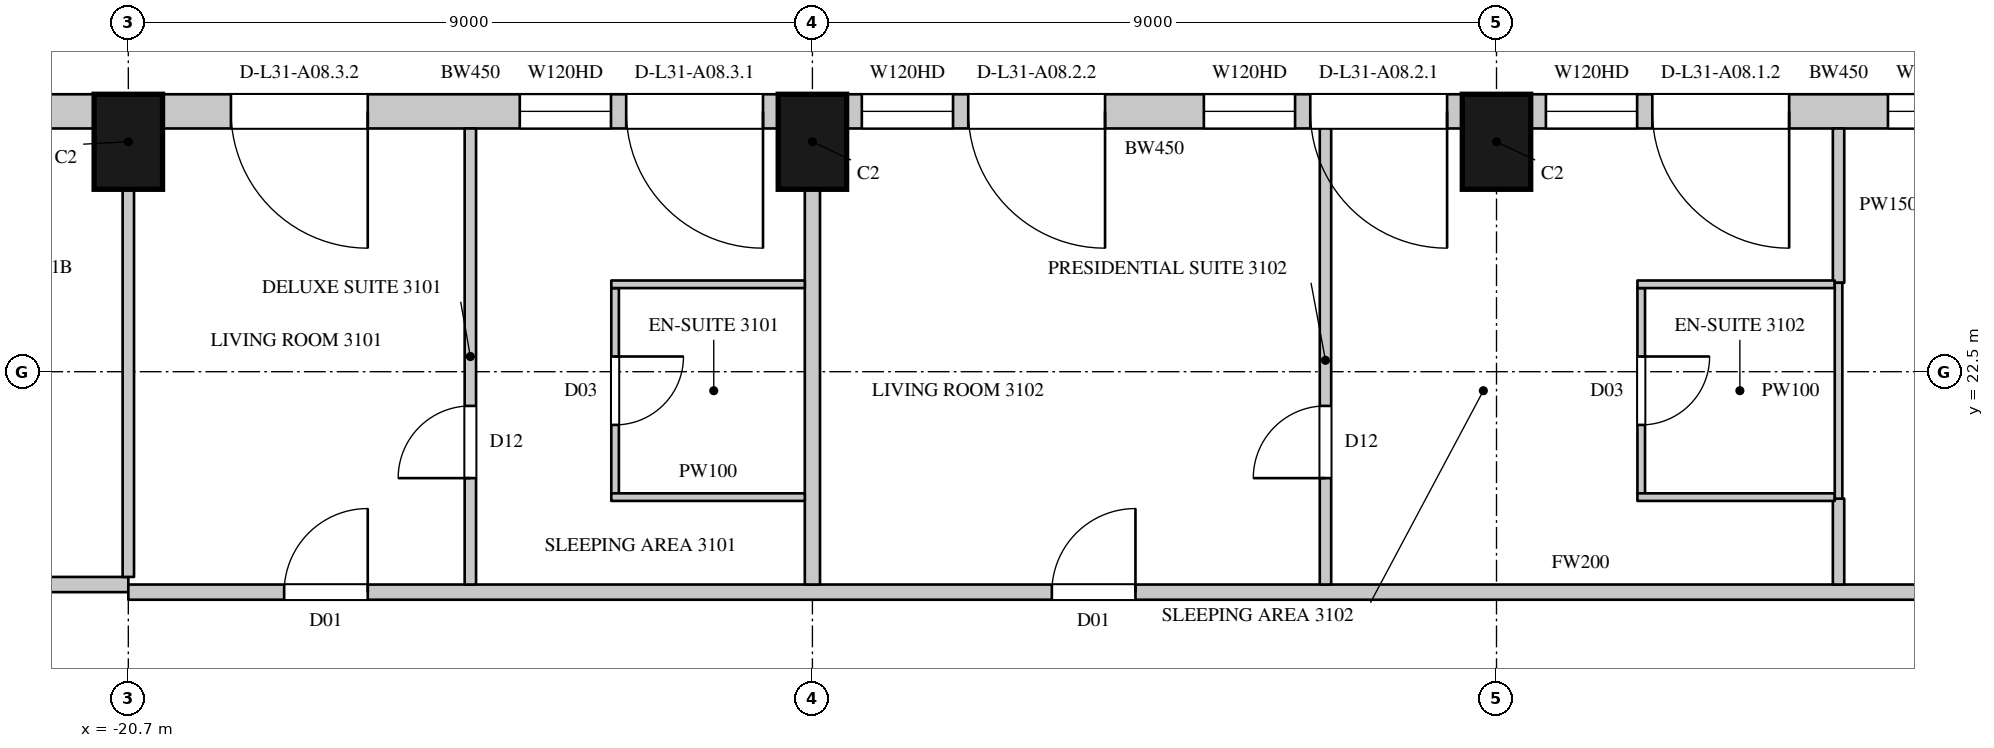
"""IFC4 building model, lengths in metres.
Left out: names, types, materials, properties, quantities, classifications, styles, units other than length and angle.
Written with IfcOpenShell. Run it as: python <this file> out.ifc"""

import sys

from ifc_helpers import new_model, si_unit, direction, frame, frame_2d, origin, origin_2d, place, context, subcontext, project, spatial, rectangle, extrude, element, fill, save


model = new_model("IFC4")
c1 = context("Model", 3, precision=1e-05, world=origin(), true_north=direction((0.0, 1.0)))
c2 = subcontext(c1, "Body", "Model", "MODEL_VIEW")
j1 = project(units=[si_unit("LENGTHUNIT", "METRE"), si_unit("PLANEANGLEUNIT", "RADIAN")], contexts=[c1])
p1 = place(None, origin())
s1 = spatial("IfcSite", under=j1, at=p1, CompositionType="ELEMENT")
p2 = place(p1, origin())
s2 = spatial("IfcBuilding", under=s1, at=p2, CompositionType="ELEMENT")
p3 = place(p2, frame((0.0, 0.0, 141.9)))
s3 = spatial("IfcBuildingStorey", under=s2, at=p3, CompositionType="ELEMENT", Elevation=141.9)
for number, where, z_axis, x_axis in (
    (1, (-2.7, 25.525, 0.0), (0.0, 0.0, 1.0), (-1.0, 0.0, 0.0)),
    (2, (-11.7, 25.525, 0.0), (0.0, 0.0, 1.0), (-1.0, 0.0, 0.0)),
    (3, (-20.7, 25.525, 0.0), (0.0, 0.0, 1.0), (-1.0, 0.0, 0.0)),
):
    element("IfcColumn", number, at=place(p3, frame(where, z_axis=z_axis, x_axis=x_axis)), inside=s3, PredefinedType="COLUMN", context=c2, shape_type="SweptSolid", body=[
        extrude(rectangle(XDim=0.9, YDim=1.25, at=origin_2d()), origin(), (0.0, 0.0, 1.0), 3.6),
    ])
p4 = place(p3, frame((5.85, 25.925, 0.0), z_axis=(0.0, 0.0, 1.0), x_axis=(-1.0, 0.0, 0.0)))
e4 = element("IfcWall", 4, at=p4, inside=s3, PredefinedType="SOLIDWALL", context=c2, shape_type="SweptSolid", body=[
    extrude(rectangle(XDim=8.1, YDim=0.45, at=frame_2d((4.05, 0.0))), origin(), (0.0, 0.0, 1.0), 3.3),
])
p5 = place(p4, frame((0.2, 0.0, 0.0)))
e5 = element("IfcOpeningElement", 5, at=p5, cuts=e4, PredefinedType="OPENING", context=c2, shape_type="SweptSolid", body=[
    extrude(rectangle(XDim=1.8, YDim=2.4, at=frame_2d((0.9, 1.2))), frame((0.0, 0.235, 0.0), z_axis=(0.0, -1.0, 0.0), x_axis=(1.0, 0.0, 0.0)), (0.0, 0.0, 1.0), 0.47),
])
p6 = place(p4, frame((2.2, 0.0, 1.05)))
e6 = element("IfcOpeningElement", 6, at=p6, cuts=e4, PredefinedType="OPENING", context=c2, shape_type="SweptSolid", body=[
    extrude(rectangle(XDim=1.2, YDim=2.0, at=frame_2d((0.6, 1.0))), frame((0.0, 0.235, 0.0), z_axis=(0.0, -1.0, 0.0), x_axis=(1.0, 0.0, 0.0)), (0.0, 0.0, 1.0), 0.47),
])
p7 = place(p4, frame((4.7, 0.0, 0.0)))
e7 = element("IfcOpeningElement", 7, at=p7, cuts=e4, PredefinedType="OPENING", context=c2, shape_type="SweptSolid", body=[
    extrude(rectangle(XDim=1.8, YDim=2.4, at=frame_2d((0.9, 1.2))), frame((0.0, 0.235, 0.0), z_axis=(0.0, -1.0, 0.0), x_axis=(1.0, 0.0, 0.0)), (0.0, 0.0, 1.0), 0.47),
])
p8 = place(p4, frame((6.7, 0.0, 1.05)))
e8 = element("IfcOpeningElement", 8, at=p8, cuts=e4, PredefinedType="OPENING", context=c2, shape_type="SweptSolid", body=[
    extrude(rectangle(XDim=1.2, YDim=2.0, at=frame_2d((0.6, 1.0))), frame((0.0, 0.235, 0.0), z_axis=(0.0, -1.0, 0.0), x_axis=(1.0, 0.0, 0.0)), (0.0, 0.0, 1.0), 0.47),
])
p9 = place(p3, frame((-3.15, 25.925, 0.0), z_axis=(0.0, 0.0, 1.0), x_axis=(-1.0, 0.0, 0.0)))
e9 = element("IfcWall", 9, at=p9, inside=s3, PredefinedType="SOLIDWALL", context=c2, shape_type="SweptSolid", body=[
    extrude(rectangle(XDim=8.1, YDim=0.45, at=frame_2d((4.05, 0.0))), origin(), (0.0, 0.0, 1.0), 3.3),
])
p10 = place(p9, frame((0.2, 0.0, 0.0)))
e10 = element("IfcOpeningElement", 10, at=p10, cuts=e9, PredefinedType="OPENING", context=c2, shape_type="SweptSolid", body=[
    extrude(rectangle(XDim=1.8, YDim=2.4, at=frame_2d((0.9, 1.2))), frame((0.0, 0.235, 0.0), z_axis=(0.0, -1.0, 0.0), x_axis=(1.0, 0.0, 0.0)), (0.0, 0.0, 1.0), 0.47),
])
p11 = place(p9, frame((2.2, 0.0, 1.05)))
e11 = element("IfcOpeningElement", 11, at=p11, cuts=e9, PredefinedType="OPENING", context=c2, shape_type="SweptSolid", body=[
    extrude(rectangle(XDim=1.2, YDim=2.0, at=frame_2d((0.6, 1.0))), frame((0.0, 0.235, 0.0), z_axis=(0.0, -1.0, 0.0), x_axis=(1.0, 0.0, 0.0)), (0.0, 0.0, 1.0), 0.47),
])
p12 = place(p9, frame((4.7, 0.0, 0.0)))
e12 = element("IfcOpeningElement", 12, at=p12, cuts=e9, PredefinedType="OPENING", context=c2, shape_type="SweptSolid", body=[
    extrude(rectangle(XDim=1.8, YDim=2.4, at=frame_2d((0.9, 1.2))), frame((0.0, 0.235, 0.0), z_axis=(0.0, -1.0, 0.0), x_axis=(1.0, 0.0, 0.0)), (0.0, 0.0, 1.0), 0.47),
])
p13 = place(p9, frame((6.7, 0.0, 1.05)))
e13 = element("IfcOpeningElement", 13, at=p13, cuts=e9, PredefinedType="OPENING", context=c2, shape_type="SweptSolid", body=[
    extrude(rectangle(XDim=1.2, YDim=2.0, at=frame_2d((0.6, 1.0))), frame((0.0, 0.235, 0.0), z_axis=(0.0, -1.0, 0.0), x_axis=(1.0, 0.0, 0.0)), (0.0, 0.0, 1.0), 0.47),
])
p14 = place(p3, frame((-12.15, 25.925, 0.0), z_axis=(0.0, 0.0, 1.0), x_axis=(-1.0, 0.0, 0.0)))
e14 = element("IfcWall", 14, at=p14, inside=s3, PredefinedType="SOLIDWALL", context=c2, shape_type="SweptSolid", body=[
    extrude(rectangle(XDim=8.1, YDim=0.45, at=frame_2d((4.05, 0.0))), origin(), (0.0, 0.0, 1.0), 3.3),
])
p15 = place(p14, frame((0.2, 0.0, 0.0)))
e15 = element("IfcOpeningElement", 15, at=p15, cuts=e14, PredefinedType="OPENING", context=c2, shape_type="SweptSolid", body=[
    extrude(rectangle(XDim=1.8, YDim=2.4, at=frame_2d((0.9, 1.2))), frame((0.0, 0.235, 0.0), z_axis=(0.0, -1.0, 0.0), x_axis=(1.0, 0.0, 0.0)), (0.0, 0.0, 1.0), 0.47),
])
p16 = place(p14, frame((2.2, 0.0, 1.05)))
e16 = element("IfcOpeningElement", 16, at=p16, cuts=e14, PredefinedType="OPENING", context=c2, shape_type="SweptSolid", body=[
    extrude(rectangle(XDim=1.2, YDim=2.0, at=frame_2d((0.6, 1.0))), frame((0.0, 0.235, 0.0), z_axis=(0.0, -1.0, 0.0), x_axis=(1.0, 0.0, 0.0)), (0.0, 0.0, 1.0), 0.47),
])
p17 = place(p14, frame((5.4, 0.0, 0.0)))
e17 = element("IfcOpeningElement", 17, at=p17, cuts=e14, PredefinedType="OPENING", context=c2, shape_type="SweptSolid", body=[
    extrude(rectangle(XDim=1.8, YDim=2.4, at=frame_2d((0.9, 1.2))), frame((0.0, 0.235, 0.0), z_axis=(0.0, -1.0, 0.0), x_axis=(1.0, 0.0, 0.0)), (0.0, 0.0, 1.0), 0.47),
])
p18 = place(p3, frame((-21.15, 25.925, 0.0), z_axis=(0.0, 0.0, 1.0), x_axis=(-1.0, 0.0, 0.0)))
e18 = element("IfcWall", 18, at=p18, inside=s3, PredefinedType="SOLIDWALL", context=c2, shape_type="SweptSolid", body=[
    extrude(rectangle(XDim=2.914, YDim=0.45, at=frame_2d((1.457, 0.0))), origin(), (0.0, 0.0, 1.0), 3.3),
])
p19 = place(p3, frame((-23.752, 19.7, 0.0), z_axis=(0.0, 0.0, 1.0), x_axis=(1.0, 0.0, 0.0)))
e19 = element("IfcWall", 19, at=p19, inside=s3, PredefinedType="PARTITIONING", context=c2, shape_type="SweptSolid", body=[
    extrude(rectangle(XDim=3.052, YDim=0.2, at=frame_2d((1.526, 0.0))), origin(), (0.0, 0.0, 1.0), 3.3),
])
p20 = place(p19, frame((0.85, 0.0, 0.0)))
e20 = element("IfcOpeningElement", 20, at=p20, cuts=e19, PredefinedType="OPENING", context=c2, shape_type="SweptSolid", body=[
    extrude(rectangle(XDim=0.9, YDim=2.2, at=frame_2d((0.45, 1.1))), frame((0.0, 0.11, 0.0), z_axis=(0.0, -1.0, 0.0), x_axis=(1.0, 0.0, 0.0)), (0.0, 0.0, 1.0), 0.22),
])
p21 = place(p3, frame((-20.7, 19.6, 0.0), z_axis=(0.0, 0.0, 1.0), x_axis=(1.0, 0.0, 0.0)))
e21 = element("IfcWall", 21, at=p21, inside=s3, PredefinedType="PARTITIONING", context=c2, shape_type="SweptSolid", body=[
    extrude(rectangle(XDim=38.214, YDim=0.2, at=frame_2d((19.107, 0.0))), origin(), (0.0, 0.0, 1.0), 3.3),
])
p22 = place(p21, frame((23.95, 0.0, 0.0)))
e22 = element("IfcOpeningElement", 22, at=p22, cuts=e21, PredefinedType="OPENING", context=c2, shape_type="SweptSolid", body=[
    extrude(rectangle(XDim=0.9, YDim=2.2, at=frame_2d((0.45, 1.1))), frame((0.0, 0.11, 0.0), z_axis=(0.0, -1.0, 0.0), x_axis=(1.0, 0.0, 0.0)), (0.0, 0.0, 1.0), 0.22),
])
p23 = place(p21, frame((2.05, 0.0, 0.0)))
e23 = element("IfcOpeningElement", 23, at=p23, cuts=e21, PredefinedType="OPENING", context=c2, shape_type="SweptSolid", body=[
    extrude(rectangle(XDim=1.1, YDim=2.4, at=frame_2d((0.55, 1.2))), frame((0.0, 0.11, 0.0), z_axis=(0.0, -1.0, 0.0), x_axis=(1.0, 0.0, 0.0)), (0.0, 0.0, 1.0), 0.22),
])
p24 = place(p21, frame((12.15, 0.0, 0.0)))
e24 = element("IfcOpeningElement", 24, at=p24, cuts=e21, PredefinedType="OPENING", context=c2, shape_type="SweptSolid", body=[
    extrude(rectangle(XDim=1.1, YDim=2.4, at=frame_2d((0.55, 1.2))), frame((0.0, 0.11, 0.0), z_axis=(0.0, -1.0, 0.0), x_axis=(1.0, 0.0, 0.0)), (0.0, 0.0, 1.0), 0.22),
])
p25 = place(p21, frame((30.2, 0.0, 0.0)))
e25 = element("IfcOpeningElement", 25, at=p25, cuts=e21, PredefinedType="OPENING", context=c2, shape_type="SweptSolid", body=[
    extrude(rectangle(XDim=0.95, YDim=2.2, at=frame_2d((0.475, 1.1))), frame((0.0, 0.11, 0.0), z_axis=(0.0, -1.0, 0.0), x_axis=(1.0, 0.0, 0.0)), (0.0, 0.0, 1.0), 0.22),
])
p26 = place(p21, frame((36.95, 0.0, 0.0)))
e26 = element("IfcOpeningElement", 26, at=p26, cuts=e21, PredefinedType="OPENING", context=c2, shape_type="SweptSolid", body=[
    extrude(rectangle(XDim=0.95, YDim=2.2, at=frame_2d((0.475, 1.1))), frame((0.0, 0.11, 0.0), z_axis=(0.0, -1.0, 0.0), x_axis=(1.0, 0.0, 0.0)), (0.0, 0.0, 1.0), 0.22),
])
p27 = place(p3, frame((-20.7, 19.8, 0.0), z_axis=(0.0, 0.0, 1.0), x_axis=(0.0, 1.0, 0.0)))
e27 = element("IfcWall", 27, at=p27, inside=s3, PredefinedType="PARTITIONING", context=c2, shape_type="SweptSolid", body=[
    extrude(rectangle(XDim=5.1, YDim=0.15, at=frame_2d((2.55, 0.0))), origin(), (0.0, 0.0, 1.0), 2.75),
])
p28 = place(p3, frame((-16.2, 19.7, 0.0), z_axis=(0.0, 0.0, 1.0), x_axis=(0.0, 1.0, 0.0)))
e28 = element("IfcWall", 28, at=p28, inside=s3, PredefinedType="PARTITIONING", context=c2, shape_type="SweptSolid", body=[
    extrude(rectangle(XDim=6.0, YDim=0.15, at=frame_2d((3.0, 0.0))), origin(), (0.0, 0.0, 1.0), 3.3),
])
p29 = place(p28, frame((1.4, 0.0, 0.0)))
e29 = element("IfcOpeningElement", 29, at=p29, cuts=e28, PredefinedType="OPENING", context=c2, shape_type="SweptSolid", body=[
    extrude(rectangle(XDim=0.95, YDim=2.2, at=frame_2d((0.475, 1.1))), frame((0.0, 0.085, 0.0), z_axis=(0.0, -1.0, 0.0), x_axis=(1.0, 0.0, 0.0)), (0.0, 0.0, 1.0), 0.17),
])
p30 = place(p3, frame((-4.95, 19.7, 0.0), z_axis=(0.0, 0.0, 1.0), x_axis=(0.0, 1.0, 0.0)))
e30 = element("IfcWall", 30, at=p30, inside=s3, PredefinedType="PARTITIONING", context=c2, shape_type="SweptSolid", body=[
    extrude(rectangle(XDim=6.0, YDim=0.15, at=frame_2d((3.0, 0.0))), origin(), (0.0, 0.0, 1.0), 3.3),
])
p31 = place(p30, frame((1.4, 0.0, 0.0)))
e31 = element("IfcOpeningElement", 31, at=p31, cuts=e30, PredefinedType="OPENING", context=c2, shape_type="SweptSolid", body=[
    extrude(rectangle(XDim=0.95, YDim=2.2, at=frame_2d((0.475, 1.1))), frame((0.0, 0.085, 0.0), z_axis=(0.0, -1.0, 0.0), x_axis=(1.0, 0.0, 0.0)), (0.0, 0.0, 1.0), 0.17),
])
p32 = place(p3, frame((1.8, 19.7, 0.0), z_axis=(0.0, 0.0, 1.0), x_axis=(0.0, 1.0, 0.0)))
e32 = element("IfcWall", 32, at=p32, inside=s3, PredefinedType="PARTITIONING", context=c2, shape_type="SweptSolid", body=[
    extrude(rectangle(XDim=1.13, YDim=0.15, at=frame_2d((0.565, 0.0))), origin(), (0.0, 0.0, 1.0), 3.3),
])
p33 = place(p3, frame((1.8, 23.67, 0.0), z_axis=(0.0, 0.0, 1.0), x_axis=(0.0, 1.0, 0.0)))
e33 = element("IfcWall", 33, at=p33, inside=s3, PredefinedType="PARTITIONING", context=c2, shape_type="SweptSolid", body=[
    extrude(rectangle(XDim=2.03, YDim=0.15, at=frame_2d((1.015, 0.0))), origin(), (0.0, 0.0, 1.0), 3.3),
])
p34 = place(p3, frame((-11.7, 19.7, 0.0), z_axis=(0.0, 0.0, 1.0), x_axis=(0.0, 1.0, 0.0)))
e34 = element("IfcWall", 34, at=p34, inside=s3, PredefinedType="PARTITIONING", context=c2, shape_type="SweptSolid", body=[
    extrude(rectangle(XDim=5.2, YDim=0.2, at=frame_2d((2.6, 0.0))), origin(), (0.0, 0.0, 1.0), 2.75),
])
p35 = place(p3, frame((-14.296, 20.9, 0.0), z_axis=(0.0, 0.0, 1.0), x_axis=(0.0, 1.0, 0.0)))
e35 = element("IfcWall", 35, at=p35, inside=s3, PredefinedType="PARTITIONING", context=c2, shape_type="SweptSolid", body=[
    extrude(rectangle(XDim=2.7, YDim=0.1, at=frame_2d((1.35, 0.0))), origin(), (0.0, 0.0, 1.0), 3.3),
])
p36 = place(p35, frame((0.9, 0.0, 0.0)))
e36 = element("IfcOpeningElement", 36, at=p36, cuts=e35, PredefinedType="OPENING", context=c2, shape_type="SweptSolid", body=[
    extrude(rectangle(XDim=0.9, YDim=2.2, at=frame_2d((0.45, 1.1))), frame((0.0, 0.06, 0.0), z_axis=(0.0, -1.0, 0.0), x_axis=(1.0, 0.0, 0.0)), (0.0, 0.0, 1.0), 0.12),
])
for number, where, z_axis, x_axis in (
    (37, (-14.346, 20.85, 0.0), (0.0, 0.0, 1.0), (1.0, 0.0, 0.0)),
    (38, (-14.346, 23.65, 0.0), (0.0, 0.0, 1.0), (1.0, 0.0, 0.0)),
):
    element("IfcWall", number, at=place(p3, frame(where, z_axis=z_axis, x_axis=x_axis)), inside=s3, PredefinedType="PARTITIONING", context=c2, shape_type="SweptSolid", body=[
        extrude(rectangle(XDim=2.546, YDim=0.1, at=frame_2d((1.273, 0.0))), origin(), (0.0, 0.0, 1.0), 3.3),
    ])
p37 = place(p3, frame((-0.796, 20.9, 0.0), z_axis=(0.0, 0.0, 1.0), x_axis=(0.0, 1.0, 0.0)))
e39 = element("IfcWall", 39, at=p37, inside=s3, PredefinedType="PARTITIONING", context=c2, shape_type="SweptSolid", body=[
    extrude(rectangle(XDim=2.7, YDim=0.1, at=frame_2d((1.35, 0.0))), origin(), (0.0, 0.0, 1.0), 3.3),
])
p38 = place(p37, frame((0.9, 0.0, 0.0)))
e40 = element("IfcOpeningElement", 40, at=p38, cuts=e39, PredefinedType="OPENING", context=c2, shape_type="SweptSolid", body=[
    extrude(rectangle(XDim=0.9, YDim=2.2, at=frame_2d((0.45, 1.1))), frame((0.0, 0.06, 0.0), z_axis=(0.0, -1.0, 0.0), x_axis=(1.0, 0.0, 0.0)), (0.0, 0.0, 1.0), 0.12),
])
for number, where, z_axis, x_axis in (
    (41, (-0.846, 20.85, 0.0), (0.0, 0.0, 1.0), (1.0, 0.0, 0.0)),
    (42, (-0.846, 23.65, 0.0), (0.0, 0.0, 1.0), (1.0, 0.0, 0.0)),
):
    element("IfcWall", number, at=place(p3, frame(where, z_axis=z_axis, x_axis=x_axis)), inside=s3, PredefinedType="PARTITIONING", context=c2, shape_type="SweptSolid", body=[
        extrude(rectangle(XDim=2.596, YDim=0.1, at=frame_2d((1.298, 0.0))), origin(), (0.0, 0.0, 1.0), 3.3),
    ])
p39 = place(p3, frame((1.8, 20.83, 0.0), z_axis=(0.0, 0.0, 1.0), x_axis=(0.0, 1.0, 0.0)))
e43 = element("IfcWall", 43, at=p39, inside=s3, PredefinedType="PARTITIONING", context=c2, shape_type="SweptSolid", body=[
    extrude(rectangle(XDim=2.84, YDim=0.1, at=frame_2d((1.42, 0.0))), origin(), (0.0, 0.0, 1.0), 3.3),
])
p40 = place(p6, origin())
e44 = element("IfcWindow", 44, at=p40, inside=s3, PartitioningType="SINGLE_PANEL", PredefinedType="WINDOW", context=c2, shape_type="SweptSolid", body=[
    extrude(rectangle(XDim=1.2, YDim=2.0, at=frame_2d((0.6, 1.0))), frame((0.0, 0.135, 0.0), z_axis=(0.0, -1.0, 0.0), x_axis=(1.0, 0.0, 0.0)), (0.0, 0.0, 1.0), 0.06),
])
fill(e6, e44)
p41 = place(p7, origin())
e45 = element("IfcDoor", 45, at=p41, inside=s3, OperationType="SLIDING_TO_LEFT", PredefinedType="DOOR", context=c2, shape_type="SweptSolid", body=[
    extrude(rectangle(XDim=1.8, YDim=2.4, at=frame_2d((0.9, 1.2))), frame((0.0, 0.13, 0.0), z_axis=(0.0, -1.0, 0.0), x_axis=(1.0, 0.0, 0.0)), (0.0, 0.0, 1.0), 0.05),
])
fill(e7, e45)
p42 = place(p8, origin())
e46 = element("IfcWindow", 46, at=p42, inside=s3, PartitioningType="SINGLE_PANEL", PredefinedType="WINDOW", context=c2, shape_type="SweptSolid", body=[
    extrude(rectangle(XDim=1.2, YDim=2.0, at=frame_2d((0.6, 1.0))), frame((0.0, 0.135, 0.0), z_axis=(0.0, -1.0, 0.0), x_axis=(1.0, 0.0, 0.0)), (0.0, 0.0, 1.0), 0.06),
])
fill(e8, e46)
p43 = place(p10, origin())
e47 = element("IfcDoor", 47, at=p43, inside=s3, OperationType="SLIDING_TO_LEFT", PredefinedType="DOOR", context=c2, shape_type="SweptSolid", body=[
    extrude(rectangle(XDim=1.8, YDim=2.4, at=frame_2d((0.9, 1.2))), frame((0.0, 0.13, 0.0), z_axis=(0.0, -1.0, 0.0), x_axis=(1.0, 0.0, 0.0)), (0.0, 0.0, 1.0), 0.05),
])
fill(e10, e47)
p44 = place(p11, origin())
e48 = element("IfcWindow", 48, at=p44, inside=s3, PartitioningType="SINGLE_PANEL", PredefinedType="WINDOW", context=c2, shape_type="SweptSolid", body=[
    extrude(rectangle(XDim=1.2, YDim=2.0, at=frame_2d((0.6, 1.0))), frame((0.0, 0.135, 0.0), z_axis=(0.0, -1.0, 0.0), x_axis=(1.0, 0.0, 0.0)), (0.0, 0.0, 1.0), 0.06),
])
fill(e11, e48)
p45 = place(p12, origin())
e49 = element("IfcDoor", 49, at=p45, inside=s3, OperationType="SLIDING_TO_LEFT", PredefinedType="DOOR", context=c2, shape_type="SweptSolid", body=[
    extrude(rectangle(XDim=1.8, YDim=2.4, at=frame_2d((0.9, 1.2))), frame((0.0, 0.13, 0.0), z_axis=(0.0, -1.0, 0.0), x_axis=(1.0, 0.0, 0.0)), (0.0, 0.0, 1.0), 0.05),
])
fill(e12, e49)
p46 = place(p13, origin())
e50 = element("IfcWindow", 50, at=p46, inside=s3, PartitioningType="SINGLE_PANEL", PredefinedType="WINDOW", context=c2, shape_type="SweptSolid", body=[
    extrude(rectangle(XDim=1.2, YDim=2.0, at=frame_2d((0.6, 1.0))), frame((0.0, 0.135, 0.0), z_axis=(0.0, -1.0, 0.0), x_axis=(1.0, 0.0, 0.0)), (0.0, 0.0, 1.0), 0.06),
])
fill(e13, e50)
p47 = place(p15, origin())
e51 = element("IfcDoor", 51, at=p47, inside=s3, OperationType="SLIDING_TO_LEFT", PredefinedType="DOOR", context=c2, shape_type="SweptSolid", body=[
    extrude(rectangle(XDim=1.8, YDim=2.4, at=frame_2d((0.9, 1.2))), frame((0.0, 0.13, 0.0), z_axis=(0.0, -1.0, 0.0), x_axis=(1.0, 0.0, 0.0)), (0.0, 0.0, 1.0), 0.05),
])
fill(e15, e51)
p48 = place(p16, origin())
e52 = element("IfcWindow", 52, at=p48, inside=s3, PartitioningType="SINGLE_PANEL", PredefinedType="WINDOW", context=c2, shape_type="SweptSolid", body=[
    extrude(rectangle(XDim=1.2, YDim=2.0, at=frame_2d((0.6, 1.0))), frame((0.0, 0.135, 0.0), z_axis=(0.0, -1.0, 0.0), x_axis=(1.0, 0.0, 0.0)), (0.0, 0.0, 1.0), 0.06),
])
fill(e16, e52)
p49 = place(p17, origin())
e53 = element("IfcDoor", 53, at=p49, inside=s3, OperationType="SLIDING_TO_LEFT", PredefinedType="DOOR", context=c2, shape_type="SweptSolid", body=[
    extrude(rectangle(XDim=1.8, YDim=2.4, at=frame_2d((0.9, 1.2))), frame((0.0, 0.13, 0.0), z_axis=(0.0, -1.0, 0.0), x_axis=(1.0, 0.0, 0.0)), (0.0, 0.0, 1.0), 0.05),
])
fill(e17, e53)
p50 = place(p23, origin())
e54 = element("IfcDoor", 54, at=p50, inside=s3, OperationType="SINGLE_SWING_RIGHT", PredefinedType="DOOR", context=c2, shape_type="SweptSolid", body=[
    extrude(rectangle(XDim=1.1, YDim=2.4, at=frame_2d((0.55, 1.2))), frame((0.0, 0.025, 0.0), z_axis=(0.0, -1.0, 0.0), x_axis=(1.0, 0.0, 0.0)), (0.0, 0.0, 1.0), 0.05),
])
fill(e23, e54)
p51 = place(p29, origin())
e55 = element("IfcDoor", 55, at=p51, inside=s3, OperationType="SINGLE_SWING_LEFT", PredefinedType="DOOR", context=c2, shape_type="SweptSolid", body=[
    extrude(rectangle(XDim=0.95, YDim=2.2, at=frame_2d((0.475, 1.1))), frame((0.0, 0.025, 0.0), z_axis=(0.0, -1.0, 0.0), x_axis=(1.0, 0.0, 0.0)), (0.0, 0.0, 1.0), 0.05),
])
fill(e29, e55)
p52 = place(p36, origin())
e56 = element("IfcDoor", 56, at=p52, inside=s3, OperationType="SINGLE_SWING_LEFT", PredefinedType="DOOR", context=c2, shape_type="SweptSolid", body=[
    extrude(rectangle(XDim=0.9, YDim=2.2, at=frame_2d((0.45, 1.1))), frame((0.0, 0.025, 0.0), z_axis=(0.0, -1.0, 0.0), x_axis=(1.0, 0.0, 0.0)), (0.0, 0.0, 1.0), 0.05),
])
fill(e36, e56)
p53 = place(p24, origin())
e57 = element("IfcDoor", 57, at=p53, inside=s3, OperationType="SINGLE_SWING_RIGHT", PredefinedType="DOOR", context=c2, shape_type="SweptSolid", body=[
    extrude(rectangle(XDim=1.1, YDim=2.4, at=frame_2d((0.55, 1.2))), frame((0.0, 0.025, 0.0), z_axis=(0.0, -1.0, 0.0), x_axis=(1.0, 0.0, 0.0)), (0.0, 0.0, 1.0), 0.05),
])
fill(e24, e57)
p54 = place(p31, origin())
e58 = element("IfcDoor", 58, at=p54, inside=s3, OperationType="SINGLE_SWING_LEFT", PredefinedType="DOOR", context=c2, shape_type="SweptSolid", body=[
    extrude(rectangle(XDim=0.95, YDim=2.2, at=frame_2d((0.475, 1.1))), frame((0.0, 0.025, 0.0), z_axis=(0.0, -1.0, 0.0), x_axis=(1.0, 0.0, 0.0)), (0.0, 0.0, 1.0), 0.05),
])
fill(e31, e58)
p55 = place(p38, origin())
e59 = element("IfcDoor", 59, at=p55, inside=s3, OperationType="SINGLE_SWING_LEFT", PredefinedType="DOOR", context=c2, shape_type="SweptSolid", body=[
    extrude(rectangle(XDim=0.9, YDim=2.2, at=frame_2d((0.45, 1.1))), frame((0.0, 0.025, 0.0), z_axis=(0.0, -1.0, 0.0), x_axis=(1.0, 0.0, 0.0)), (0.0, 0.0, 1.0), 0.05),
])
fill(e40, e59)
save(model, sys.argv[1])
